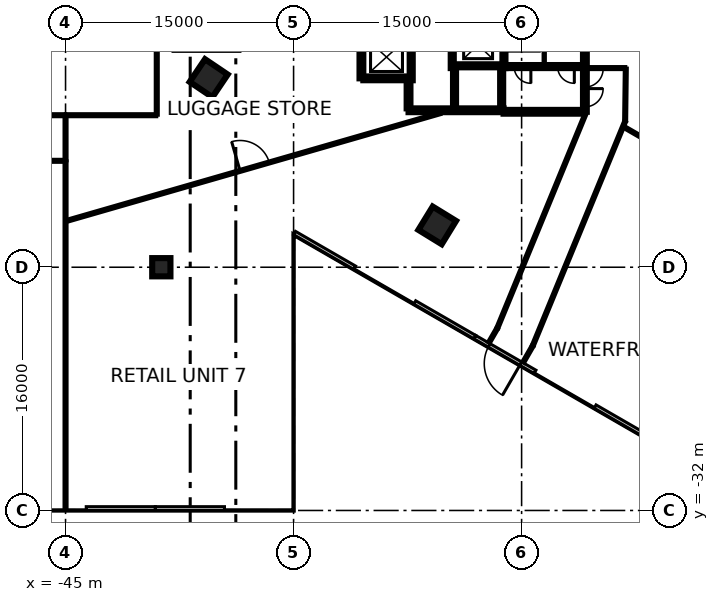
"""IFC4 building model, lengths in metres.
Left out: names, types, materials, properties, quantities, classifications, styles, units other than length and angle.
Written with IfcOpenShell. Run it as: python <this file> out.ifc"""

import sys

from ifc_helpers import new_model, si_unit, direction, frame, frame_2d, origin, origin_2d, place, context, subcontext, project, spatial, rectangle, extrude, element, fill, save


model = new_model("IFC4")
c1 = context("Model", 3, precision=1e-05, world=origin(), true_north=direction((0.0, 1.0)))
c2 = subcontext(c1, "Body", "Model", "MODEL_VIEW")
j1 = project(units=[si_unit("LENGTHUNIT", "METRE"), si_unit("PLANEANGLEUNIT", "RADIAN")], contexts=[c1])
p1 = place(None, origin())
s1 = spatial("IfcSite", under=j1, at=p1, CompositionType="ELEMENT")
p2 = place(p1, origin())
s2 = spatial("IfcBuilding", under=s1, at=p2, CompositionType="ELEMENT")
p3 = place(p2, origin())
s3 = spatial("IfcBuildingStorey", under=s2, at=p3, CompositionType="ELEMENT", Elevation=0.0)
for number, where, z_axis, x_axis in (
    (1, (-35.583, -3.565, -0.45), (0.0, 0.0, 1.0), (0.559, 0.829, 0.0)),
    (2, (-20.552, -13.248, -0.45), (0.0, 0.0, 1.0), (0.523, 0.852, 0.0)),
):
    element("IfcColumn", number, at=place(p3, frame(where, z_axis=z_axis, x_axis=x_axis)), inside=s3, PredefinedType="COLUMN", context=c2, shape_type="SweptSolid", body=[
        extrude(rectangle(XDim=1.8, YDim=1.8, at=origin_2d()), origin(), (0.0, 0.0, 1.0), 5.15),
    ])
p4 = place(p3, frame((-38.7, -16.0, -0.45), z_axis=(0.0, 0.0, 1.0), x_axis=(1.0, 0.0, 0.0)))
e3 = element("IfcColumn", 3, at=p4, inside=s3, PredefinedType="COLUMN", context=c2, shape_type="SweptSolid", body=[
    extrude(rectangle(XDim=1.2, YDim=1.2, at=origin_2d()), origin(), (0.0, 0.0, 1.0), 7.55),
])
p5 = place(p3, frame((-25.983, -16.031, 0.0), z_axis=(0.0, 0.0, 1.0), x_axis=(-0.866023543838, 0.500003221507, 0.0)))
e4 = element("IfcWall", 4, at=p5, inside=s3, PredefinedType="SOLIDWALL", context=c2, shape_type="SweptSolid", body=[
    extrude(rectangle(XDim=4.566, YDim=0.25, at=frame_2d((2.283, 0.0))), origin(), (0.0, 0.0, 1.0), 7.1),
])
p6 = place(p3, frame((-18.074, -20.598, 0.0), z_axis=(0.0, 0.0, 1.0), x_axis=(-0.866010176527, 0.500026373457, 0.0)))
e5 = element("IfcWall", 5, at=p6, inside=s3, PredefinedType="SOLIDWALL", context=c2, shape_type="SweptSolid", body=[
    extrude(rectangle(XDim=4.566, YDim=0.25, at=frame_2d((2.283, 0.0))), origin(), (0.0, 0.0, 1.0), 7.1),
])
p7 = place(p3, frame((-14.119, -22.881, 0.0), z_axis=(0.0, 0.0, 1.0), x_axis=(-0.866023543838, 0.500003221507, 0.0)))
e6 = element("IfcWall", 6, at=p7, inside=s3, PredefinedType="SOLIDWALL", context=c2, shape_type="SweptSolid", body=[
    extrude(rectangle(XDim=4.566, YDim=0.25, at=frame_2d((2.283, 0.0))), origin(), (0.0, 0.0, 1.0), 7.1),
])
p8 = place(p7, frame((1.083, 0.0, 0.0)))
e7 = element("IfcOpeningElement", 7, at=p8, cuts=e6, PredefinedType="OPENING", context=c2, shape_type="SweptSolid", body=[
    extrude(rectangle(XDim=2.4, YDim=2.4, at=frame_2d((1.2, 1.2))), frame((0.0, 0.135, 0.0), z_axis=(0.0, -1.0, 0.0), x_axis=(1.0, 0.0, 0.0)), (0.0, 0.0, 1.0), 0.27),
])
p9 = place(p3, frame((-6.21, -27.447, 0.0), z_axis=(0.0, 0.0, 1.0), x_axis=(-0.866046694585, 0.499963121439, 0.0)))
e8 = element("IfcWall", 8, at=p9, inside=s3, PredefinedType="SOLIDWALL", context=c2, shape_type="SweptSolid", body=[
    extrude(rectangle(XDim=4.566, YDim=0.25, at=frame_2d((2.283, 0.0))), origin(), (0.0, 0.0, 1.0), 7.1),
])
for number, where, z_axis, x_axis in (
    (9, (-39.092, -31.875, 0.0), (0.0, 0.0, 1.0), (-1.0, 0.0, 0.0)),
    (10, (-34.546, -31.875, 0.0), (0.0, 0.0, 1.0), (-1.0, 0.0, 0.0)),
):
    element("IfcWall", number, at=place(p3, frame(where, z_axis=z_axis, x_axis=x_axis)), inside=s3, PredefinedType="SOLIDWALL", context=c2, shape_type="SweptSolid", body=[
        extrude(rectangle(XDim=4.546, YDim=0.25, at=frame_2d((2.273, 0.0))), origin(), (0.0, 0.0, 1.0), 7.1),
    ])
p10 = place(p3, frame((-10.837, 5.775, 0.0), z_axis=(0.0, 0.0, 1.0), x_axis=(0.0, -1.0, 0.0)))
e11 = element("IfcWall", 11, at=p10, inside=s3, PredefinedType="SHEAR", context=c2, shape_type="SweptSolid", body=[
    extrude(rectangle(XDim=11.55, YDim=0.25, at=frame_2d((5.775, 0.0))), origin(), (0.0, 0.0, 1.0), 7.1),
])
p11 = place(p10, frame((10.025, 0.0, 0.0)))
e12 = element("IfcOpeningElement", 12, at=p11, cuts=e11, PredefinedType="OPENING", context=c2, shape_type="SweptSolid", body=[
    extrude(rectangle(XDim=1.2, YDim=2.1, at=frame_2d((0.6, 1.05))), frame((0.0, 0.135, 0.0), z_axis=(0.0, -1.0, 0.0), x_axis=(1.0, 0.0, 0.0)), (0.0, 0.0, 1.0), 0.27),
])
p12 = place(p10, frame((8.725, 0.0, 0.0)))
e13 = element("IfcOpeningElement", 13, at=p12, cuts=e11, PredefinedType="OPENING", context=c2, shape_type="SweptSolid", body=[
    extrude(rectangle(XDim=1.2, YDim=2.1, at=frame_2d((0.6, 1.05))), frame((0.0, 0.135, 0.0), z_axis=(0.0, -1.0, 0.0), x_axis=(1.0, 0.0, 0.0)), (0.0, 0.0, 1.0), 0.27),
])
p13 = place(p3, frame((-16.187, -5.675, 0.0), z_axis=(0.0, 0.0, 1.0), x_axis=(-1.0, 0.0, 0.0)))
e14 = element("IfcWall", 14, at=p13, inside=s3, PredefinedType="SHEAR", context=c2, shape_type="SweptSolid", body=[
    extrude(rectangle(XDim=6.25, YDim=0.25, at=frame_2d((3.125, 0.0))), origin(), (0.0, 0.0, 1.0), 7.1),
])
p14 = place(p3, frame((-25.537, -3.575, 0.0), z_axis=(0.0, 0.0, 1.0), x_axis=(0.0, 1.0, 0.0)))
e15 = element("IfcWall", 15, at=p14, inside=s3, PredefinedType="SHEAR", context=c2, shape_type="SweptSolid", body=[
    extrude(rectangle(XDim=5.85, YDim=0.25, at=frame_2d((2.925, 0.0))), origin(), (0.0, 0.0, 1.0), 7.1),
])
p15 = place(p3, frame((-10.963, -5.775, 0.0), z_axis=(0.0, 0.0, 1.0), x_axis=(-1.0, 0.0, 0.0)))
e16 = element("IfcWall", 16, at=p15, inside=s3, PredefinedType="SHEAR", context=c2, shape_type="SweptSolid", body=[
    extrude(rectangle(XDim=5.225, YDim=0.25, at=frame_2d((2.612, 0.0))), origin(), (0.0, 0.0, 1.0), 7.1),
])
p16 = place(p3, frame((-22.437, -3.575, 0.0), z_axis=(0.0, 0.0, 1.0), x_axis=(-1.0, 0.0, 0.0)))
e17 = element("IfcWall", 17, at=p16, inside=s3, PredefinedType="SHEAR", context=c2, shape_type="SweptSolid", body=[
    extrude(rectangle(XDim=2.975, YDim=0.25, at=frame_2d((1.487, 0.0))), origin(), (0.0, 0.0, 1.0), 7.1),
])
p17 = place(p3, frame((-22.437, -5.55, 0.0), z_axis=(0.0, 0.0, 1.0), x_axis=(0.0, 1.0, 0.0)))
e18 = element("IfcWall", 18, at=p17, inside=s3, PredefinedType="SHEAR", context=c2, shape_type="SweptSolid", body=[
    extrude(rectangle(XDim=1.849, YDim=0.25, at=frame_2d((0.925, 0.0))), origin(), (0.0, 0.0, 1.0), 7.1),
])
p18 = place(p3, frame((-16.162, 2.951, 0.0), z_axis=(0.0, 0.0, 1.0), x_axis=(0.0, -1.0, 0.0)))
e19 = element("IfcWall", 19, at=p18, inside=s3, PredefinedType="SHEAR", context=c2, shape_type="SweptSolid", body=[
    extrude(rectangle(XDim=5.851, YDim=0.2, at=frame_2d((2.925, 0.0))), origin(), (0.0, 0.0, 1.0), 7.1),
])
p19 = place(p3, frame((-19.562, -2.9, 0.0), z_axis=(0.0, 0.0, 1.0), x_axis=(0.0, 1.0, 0.0)))
e20 = element("IfcWall", 20, at=p19, inside=s3, PredefinedType="SHEAR", context=c2, shape_type="SweptSolid", body=[
    extrude(rectangle(XDim=6.1, YDim=0.2, at=frame_2d((3.05, 0.0))), origin(), (0.0, 0.0, 1.0), 7.1),
])
p20 = place(p19, frame((3.95, 0.0, 0.0)))
e21 = element("IfcOpeningElement", 21, at=p20, cuts=e20, PredefinedType="OPENING", context=c2, shape_type="SweptSolid", body=[
    extrude(rectangle(XDim=1.1, YDim=2.1, at=frame_2d((0.55, 1.05))), frame((0.0, 0.11, 0.0), z_axis=(0.0, -1.0, 0.0), x_axis=(1.0, 0.0, 0.0)), (0.0, 0.0, 1.0), 0.22),
])
p21 = place(p19, frame((0.968, 0.0, 0.0)))
e22 = element("IfcOpeningElement", 22, at=p21, cuts=e20, PredefinedType="OPENING", context=c2, shape_type="SweptSolid", body=[
    extrude(rectangle(XDim=1.1, YDim=2.1, at=frame_2d((0.55, 1.05))), frame((0.0, 0.11, 0.0), z_axis=(0.0, -1.0, 0.0), x_axis=(1.0, 0.0, 0.0)), (0.0, 0.0, 1.0), 0.22),
])
p22 = place(p3, frame((-22.262, 2.4, 0.0), z_axis=(0.0, 0.0, 1.0), x_axis=(0.0, -1.0, 0.0)))
e23 = element("IfcWall", 23, at=p22, inside=s3, PredefinedType="SHEAR", context=c2, shape_type="SweptSolid", body=[
    extrude(rectangle(XDim=6.1, YDim=0.2, at=frame_2d((3.05, 0.0))), origin(), (0.0, 0.0, 1.0), 7.1),
])
p23 = place(p22, frame((1.0, 0.0, 0.0)))
e24 = element("IfcOpeningElement", 24, at=p23, cuts=e23, PredefinedType="OPENING", context=c2, shape_type="SweptSolid", body=[
    extrude(rectangle(XDim=1.2, YDim=2.1, at=frame_2d((0.6, 1.05))), frame((0.0, 0.11, 0.0), z_axis=(0.0, -1.0, 0.0), x_axis=(1.0, 0.0, 0.0)), (0.0, 0.0, 1.0), 0.22),
])
p24 = place(p22, frame((4.05, 0.0, 0.0)))
e25 = element("IfcOpeningElement", 25, at=p24, cuts=e23, PredefinedType="OPENING", context=c2, shape_type="SweptSolid", body=[
    extrude(rectangle(XDim=1.2, YDim=2.1, at=frame_2d((0.6, 1.05))), frame((0.0, 0.11, 0.0), z_axis=(0.0, -1.0, 0.0), x_axis=(1.0, 0.0, 0.0)), (0.0, 0.0, 1.0), 0.22),
])
p25 = place(p3, frame((-10.963, -2.8, 0.0), z_axis=(0.0, 0.0, 1.0), x_axis=(-1.0, 0.0, 0.0)))
e26 = element("IfcWall", 26, at=p25, inside=s3, PredefinedType="SHEAR", context=c2, shape_type="SweptSolid", body=[
    extrude(rectangle(XDim=5.098, YDim=0.2, at=frame_2d((2.549, 0.0))), origin(), (0.0, 0.0, 1.0), 7.1),
])
p26 = place(p25, frame((0.569, 0.0, 0.0)))
e27 = element("IfcOpeningElement", 27, at=p26, cuts=e26, PredefinedType="OPENING", context=c2, shape_type="SweptSolid", body=[
    extrude(rectangle(XDim=1.1, YDim=2.1, at=frame_2d((0.55, 1.05))), frame((0.0, 0.11, 0.0), z_axis=(0.0, -1.0, 0.0), x_axis=(1.0, 0.0, 0.0)), (0.0, 0.0, 1.0), 0.22),
])
p27 = place(p25, frame((3.428, 0.0, 0.0)))
e28 = element("IfcOpeningElement", 28, at=p27, cuts=e26, PredefinedType="OPENING", context=c2, shape_type="SweptSolid", body=[
    extrude(rectangle(XDim=1.1, YDim=2.1, at=frame_2d((0.55, 1.05))), frame((0.0, 0.11, 0.0), z_axis=(0.0, -1.0, 0.0), x_axis=(1.0, 0.0, 0.0)), (0.0, 0.0, 1.0), 0.22),
])
p28 = place(p3, frame((-19.412, -2.75, 0.0), z_axis=(0.0, 0.0, 1.0), x_axis=(1.0, 0.0, 0.0)))
e29 = element("IfcWall", 29, at=p28, inside=s3, PredefinedType="SHEAR", context=c2, shape_type="SweptSolid", body=[
    extrude(rectangle(XDim=3.1, YDim=0.2, at=frame_2d((1.55, 0.0))), origin(), (0.0, 0.0, 1.0), 7.1),
])
p29 = place(p3, frame((-16.312, -2.898, 0.0), z_axis=(0.0, 0.0, 1.0), x_axis=(0.0, -1.0, 0.0)))
e30 = element("IfcWall", 30, at=p29, inside=s3, PredefinedType="SHEAR", context=c2, shape_type="SweptSolid", body=[
    extrude(rectangle(XDim=2.651, YDim=0.2, at=frame_2d((1.325, 0.0))), origin(), (0.0, 0.0, 1.0), 7.1),
])
p30 = place(p29, frame((0.652, 0.0, 0.0)))
e31 = element("IfcOpeningElement", 31, at=p30, cuts=e30, PredefinedType="OPENING", context=c2, shape_type="SweptSolid", body=[
    extrude(rectangle(XDim=1.3, YDim=2.1, at=frame_2d((0.65, 1.05))), frame((0.0, 0.11, 0.0), z_axis=(0.0, -1.0, 0.0), x_axis=(1.0, 0.0, 0.0)), (0.0, 0.0, 1.0), 0.22),
])
p31 = place(p3, frame((-19.412, -5.549, 0.0), z_axis=(0.0, 0.0, 1.0), x_axis=(0.0, 1.0, 0.0)))
e32 = element("IfcWall", 32, at=p31, inside=s3, PredefinedType="SHEAR", context=c2, shape_type="SweptSolid", body=[
    extrude(rectangle(XDim=2.651, YDim=0.2, at=frame_2d((1.325, 0.0))), origin(), (0.0, 0.0, 1.0), 7.1),
])
p32 = place(p3, frame((-13.512, -2.695, 0.0), z_axis=(0.0, 0.0, 1.0), x_axis=(0.0, 1.0, 0.0)))
e33 = element("IfcWall", 33, at=p32, inside=s3, PredefinedType="PARTITIONING", context=c2, shape_type="SweptSolid", body=[
    extrude(rectangle(XDim=1.18, YDim=0.15, at=frame_2d((0.59, 0.0))), origin(), (0.0, 0.0, 1.0), 7.1),
])
p33 = place(p3, frame((-89.095, -6.0, 0.0), z_axis=(0.0, 0.0, 1.0), x_axis=(1.0, 0.0, 0.0)))
e34 = element("IfcWall", 34, at=p33, inside=s3, PredefinedType="PARTITIONING", context=c2, shape_type="SweptSolid", body=[
    extrude(rectangle(XDim=44.107, YDim=0.2, at=frame_2d((22.053, 0.0))), origin(), (0.0, 0.0, 1.0), 7.1),
])
p34 = place(p33, frame((23.596, 0.0, 0.0)))
e35 = element("IfcOpeningElement", 35, at=p34, cuts=e34, PredefinedType="OPENING", context=c2, shape_type="SweptSolid", body=[
    extrude(rectangle(XDim=2.4, YDim=2.1, at=frame_2d((1.2, 1.05))), frame((0.0, 0.11, 0.0), z_axis=(0.0, -1.0, 0.0), x_axis=(1.0, 0.0, 0.0)), (0.0, 0.0, 1.0), 0.22),
])
p35 = place(p33, frame((1.601, 0.0, 0.0)))
e36 = element("IfcOpeningElement", 36, at=p35, cuts=e34, PredefinedType="OPENING", context=c2, shape_type="SweptSolid", body=[
    extrude(rectangle(XDim=2.4, YDim=2.1, at=frame_2d((1.2, 1.05))), frame((0.0, 0.11, 0.0), z_axis=(0.0, -1.0, 0.0), x_axis=(1.0, 0.0, 0.0)), (0.0, 0.0, 1.0), 0.22),
])
p36 = place(p3, frame((-83.598, -9.0, 0.0), z_axis=(0.0, 0.0, 1.0), x_axis=(1.0, 0.0, 0.0)))
e37 = element("IfcWall", 37, at=p36, inside=s3, PredefinedType="PARTITIONING", context=c2, shape_type="SweptSolid", body=[
    extrude(rectangle(XDim=38.598, YDim=0.2, at=frame_2d((19.299, 0.0))), origin(), (0.0, 0.0, 1.0), 7.1),
])
p37 = place(p36, frame((15.649, 0.0, 0.0)))
e38 = element("IfcOpeningElement", 38, at=p37, cuts=e37, PredefinedType="OPENING", context=c2, shape_type="SweptSolid", body=[
    extrude(rectangle(XDim=0.9, YDim=2.1, at=frame_2d((0.45, 1.05))), frame((0.0, 0.11, 0.0), z_axis=(0.0, -1.0, 0.0), x_axis=(1.0, 0.0, 0.0)), (0.0, 0.0, 1.0), 0.22),
])
p38 = place(p36, frame((30.093, 0.0, 0.0)))
e39 = element("IfcOpeningElement", 39, at=p38, cuts=e37, PredefinedType="OPENING", context=c2, shape_type="SweptSolid", body=[
    extrude(rectangle(XDim=2.0, YDim=2.1, at=frame_2d((1.0, 1.05))), frame((0.0, 0.11, 0.0), z_axis=(0.0, -1.0, 0.0), x_axis=(1.0, 0.0, 0.0)), (0.0, 0.0, 1.0), 0.22),
])
p39 = place(p3, frame((-45.0, -9.0, 0.0), z_axis=(0.0, 0.0, 1.0), x_axis=(0.0, 1.0, 0.0)))
e40 = element("IfcWall", 40, at=p39, inside=s3, PredefinedType="PARTITIONING", context=c2, shape_type="SweptSolid", body=[
    extrude(rectangle(XDim=2.998, YDim=0.2, at=frame_2d((1.499, 0.0))), origin(), (0.0, 0.0, 1.0), 7.1),
])
p40 = place(p3, frame((-17.16, -20.981, 0.0), z_axis=(0.0, 0.0, 1.0), x_axis=(0.500069753975, 0.865985127562, 0.0)))
e41 = element("IfcWall", 41, at=p40, inside=s3, PredefinedType="PARTITIONING", context=c2, shape_type="SweptSolid", body=[
    extrude(rectangle(XDim=1.115, YDim=0.2, at=frame_2d((0.558, 0.0))), origin(), (0.0, 0.0, 1.0), 7.1),
])
p41 = place(p3, frame((-16.602, -20.015, 0.0), z_axis=(0.0, 0.0, 1.0), x_axis=(0.380627809016, 0.924728322808, 0.0)))
e42 = element("IfcWall", 42, at=p41, inside=s3, PredefinedType="PARTITIONING", context=c2, shape_type="SweptSolid", body=[
    extrude(rectangle(XDim=15.199, YDim=0.2, at=frame_2d((7.6, 0.0))), origin(), (0.0, 0.0, 1.0), 4.7),
])
p42 = place(p3, frame((-14.908, -22.281, 0.0), z_axis=(0.0, 0.0, 1.0), x_axis=(0.499223722114, 0.866473124384, 0.0)))
e43 = element("IfcWall", 43, at=p42, inside=s3, PredefinedType="PARTITIONING", context=c2, shape_type="SweptSolid", body=[
    extrude(rectangle(XDim=1.286, YDim=0.2, at=frame_2d((0.643, 0.0))), origin(), (0.0, 0.0, 1.0), 7.1),
])
p43 = place(p3, frame((-14.266, -21.167, 0.0), z_axis=(0.0, 0.0, 1.0), x_axis=(0.380713644122, 0.924692987526, 0.0)))
e44 = element("IfcWall", 44, at=p43, inside=s3, PredefinedType="PARTITIONING", context=c2, shape_type="SweptSolid", body=[
    extrude(rectangle(XDim=15.96, YDim=0.2, at=frame_2d((7.98, 0.0))), origin(), (0.0, 0.0, 1.0), 4.7),
])
p44 = place(p3, frame((-10.652, -2.9, 0.0), z_axis=(0.0, 0.0, 1.0), x_axis=(1.0, 0.0, 0.0)))
e45 = element("IfcWall", 45, at=p44, inside=s3, PredefinedType="PARTITIONING", context=c2, shape_type="SweptSolid", body=[
    extrude(rectangle(XDim=2.506, YDim=0.2, at=frame_2d((1.253, 0.0))), origin(), (0.0, 0.0, 1.0), 7.1),
])
p45 = place(p3, frame((-8.19, -6.409, 0.0), z_axis=(0.0, 0.0, 1.0), x_axis=(0.012522499567, 0.999921590428, 0.0)))
e46 = element("IfcWall", 46, at=p45, inside=s3, PredefinedType="PARTITIONING", context=c2, shape_type="SweptSolid", body=[
    extrude(rectangle(XDim=3.509, YDim=0.2, at=frame_2d((1.755, 0.0))), origin(), (0.0, 0.0, 1.0), 7.1),
])
p46 = place(p3, frame((-45.01, -6.0, 0.0), z_axis=(0.0, 0.0, 1.0), x_axis=(1.0, 0.0, 0.0)))
e47 = element("IfcWall", 47, at=p46, inside=s3, PredefinedType="PARTITIONING", context=c2, shape_type="SweptSolid", body=[
    extrude(rectangle(XDim=6.01, YDim=0.2, at=frame_2d((3.005, 0.0))), origin(), (0.0, 0.0, 1.0), 7.1),
])
p47 = place(p3, frame((-45.0, -31.995, 0.0), z_axis=(0.0, 0.0, 1.0), x_axis=(0.0, 1.0, 0.0)))
e48 = element("IfcWall", 48, at=p47, inside=s3, PredefinedType="PARTITIONING", context=c2, shape_type="SweptSolid", body=[
    extrude(rectangle(XDim=22.993, YDim=0.2, at=frame_2d((11.497, 0.0))), origin(), (0.0, 0.0, 1.0), 7.1),
])
p48 = place(p3, frame((-44.998, -12.972, 0.0), z_axis=(0.0, 0.0, 1.0), x_axis=(0.960873245647, 0.27698845788, 0.0)))
e49 = element("IfcWall", 49, at=p48, inside=s3, PredefinedType="PARTITIONING", context=c2, shape_type="SweptSolid", body=[
    extrude(rectangle(XDim=25.676, YDim=0.2, at=frame_2d((12.838, 0.0))), origin(), (0.0, 0.0, 1.0), 4.7),
])
p49 = place(p48, frame((11.946, 0.0, 0.0)))
e50 = element("IfcOpeningElement", 50, at=p49, cuts=e49, PredefinedType="OPENING", context=c2, shape_type="SweptSolid", body=[
    extrude(rectangle(XDim=2.0, YDim=2.1, at=frame_2d((1.0, 1.05))), frame((0.0, 0.11, 0.0), z_axis=(0.0, -1.0, 0.0), x_axis=(1.0, 0.0, 0.0)), (0.0, 0.0, 1.0), 0.22),
])
p50 = place(p3, frame((-39.0, -6.0, 0.0), z_axis=(0.0, 0.0, 1.0), x_axis=(0.0, 1.0, 0.0)))
e51 = element("IfcWall", 51, at=p50, inside=s3, PredefinedType="PARTITIONING", context=c2, shape_type="SweptSolid", body=[
    extrude(rectangle(XDim=12.0, YDim=0.2, at=frame_2d((6.0, 0.0))), origin(), (0.0, 0.0, 1.0), 7.1),
])
p51 = place(p50, frame((9.044, 0.0, 0.0)))
e52 = element("IfcOpeningElement", 52, at=p51, cuts=e51, PredefinedType="OPENING", context=c2, shape_type="SweptSolid", body=[
    extrude(rectangle(XDim=2.4, YDim=2.1, at=frame_2d((1.2, 1.05))), frame((0.0, 0.11, 0.0), z_axis=(0.0, -1.0, 0.0), x_axis=(1.0, 0.0, 0.0)), (0.0, 0.0, 1.0), 0.22),
])
p52 = place(p3, frame((-8.321, -6.743, 0.0), z_axis=(0.0, 0.0, 1.0), x_axis=(0.8660028672, -0.500039032478, 0.0)))
e53 = element("IfcWall", 53, at=p52, inside=s3, PredefinedType="PARTITIONING", context=c2, shape_type="SweptSolid", body=[
    extrude(rectangle(XDim=7.588, YDim=0.2, at=frame_2d((3.794, 0.0))), origin(), (0.0, 0.0, 1.0), 7.1),
])
p53 = place(p52, frame((2.794, 0.0, 0.0)))
e54 = element("IfcOpeningElement", 54, at=p53, cuts=e53, PredefinedType="OPENING", context=c2, shape_type="SweptSolid", body=[
    extrude(rectangle(XDim=2.0, YDim=2.1, at=frame_2d((1.0, 1.05))), frame((0.0, 0.11, 0.0), z_axis=(0.0, -1.0, 0.0), x_axis=(1.0, 0.0, 0.0)), (0.0, 0.0, 1.0), 0.22),
])
p54 = place(p8, origin())
e55 = element("IfcDoor", 55, at=p54, inside=s3, OperationType="DOUBLE_DOOR_DOUBLE_SWING", PredefinedType="DOOR", context=c2, shape_type="SweptSolid", body=[
    extrude(rectangle(XDim=2.4, YDim=2.4, at=frame_2d((1.2, 1.2))), frame((0.0, 0.025, 0.0), z_axis=(0.0, -1.0, 0.0), x_axis=(1.0, 0.0, 0.0)), (0.0, 0.0, 1.0), 0.05),
])
fill(e7, e55)
p55 = place(p30, origin())
e56 = element("IfcDoor", 56, at=p55, inside=s3, OperationType="SLIDING_TO_LEFT", PredefinedType="DOOR", context=c2, shape_type="SweptSolid", body=[
    extrude(rectangle(XDim=1.3, YDim=2.1, at=frame_2d((0.65, 1.05))), frame((0.0, 0.025, 0.0), z_axis=(0.0, -1.0, 0.0), x_axis=(1.0, 0.0, 0.0)), (0.0, 0.0, 1.0), 0.05),
])
fill(e31, e56)
p56 = place(p21, origin())
e57 = element("IfcDoor", 57, at=p56, inside=s3, OperationType="DOUBLE_DOOR_SLIDING", PredefinedType="DOOR", context=c2, shape_type="SweptSolid", body=[
    extrude(rectangle(XDim=1.1, YDim=2.1, at=frame_2d((0.55, 1.05))), frame((0.0, 0.025, 0.0), z_axis=(0.0, -1.0, 0.0), x_axis=(1.0, 0.0, 0.0)), (0.0, 0.0, 1.0), 0.05),
])
fill(e22, e57)
p57 = place(p24, origin())
e58 = element("IfcDoor", 58, at=p57, inside=s3, OperationType="DOUBLE_DOOR_SLIDING", PredefinedType="DOOR", context=c2, shape_type="SweptSolid", body=[
    extrude(rectangle(XDim=1.2, YDim=2.1, at=frame_2d((0.6, 1.05))), frame((0.0, 0.025, 0.0), z_axis=(0.0, -1.0, 0.0), x_axis=(1.0, 0.0, 0.0)), (0.0, 0.0, 1.0), 0.05),
])
fill(e25, e58)
p58 = place(p11, origin())
e59 = element("IfcDoor", 59, at=p58, inside=s3, OperationType="SINGLE_SWING_LEFT", PredefinedType="DOOR", context=c2, shape_type="SweptSolid", body=[
    extrude(rectangle(XDim=1.2, YDim=2.1, at=frame_2d((0.6, 1.05))), frame((0.0, 0.025, 0.0), z_axis=(0.0, -1.0, 0.0), x_axis=(1.0, 0.0, 0.0)), (0.0, 0.0, 1.0), 0.05),
])
fill(e12, e59)
p59 = place(p12, origin())
e60 = element("IfcDoor", 60, at=p59, inside=s3, OperationType="SINGLE_SWING_RIGHT", PredefinedType="DOOR", context=c2, shape_type="SweptSolid", body=[
    extrude(rectangle(XDim=1.2, YDim=2.1, at=frame_2d((0.6, 1.05))), frame((0.0, 0.025, 0.0), z_axis=(0.0, -1.0, 0.0), x_axis=(1.0, 0.0, 0.0)), (0.0, 0.0, 1.0), 0.05),
])
fill(e13, e60)
p60 = place(p26, origin())
e61 = element("IfcDoor", 61, at=p60, inside=s3, OperationType="SINGLE_SWING_LEFT", PredefinedType="DOOR", context=c2, shape_type="SweptSolid", body=[
    extrude(rectangle(XDim=1.1, YDim=2.1, at=frame_2d((0.55, 1.05))), frame((0.0, 0.025, 0.0), z_axis=(0.0, -1.0, 0.0), x_axis=(1.0, 0.0, 0.0)), (0.0, 0.0, 1.0), 0.05),
])
fill(e27, e61)
p61 = place(p27, origin())
e62 = element("IfcDoor", 62, at=p61, inside=s3, OperationType="SINGLE_SWING_RIGHT", PredefinedType="DOOR", context=c2, shape_type="SweptSolid", body=[
    extrude(rectangle(XDim=1.1, YDim=2.1, at=frame_2d((0.55, 1.05))), frame((0.0, 0.025, 0.0), z_axis=(0.0, -1.0, 0.0), x_axis=(1.0, 0.0, 0.0)), (0.0, 0.0, 1.0), 0.05),
])
fill(e28, e62)
p62 = place(p49, frame((2.0, 0.0, 0.0), z_axis=(0.0, 0.0, 1.0), x_axis=(-1.0, 0.0, 0.0)))
e63 = element("IfcDoor", 63, at=p62, inside=s3, OperationType="DOUBLE_DOOR_SINGLE_SWING", PredefinedType="DOOR", context=c2, shape_type="SweptSolid", body=[
    extrude(rectangle(XDim=2.0, YDim=2.1, at=frame_2d((1.0, 1.05))), frame((0.0, 0.025, 0.0), z_axis=(0.0, -1.0, 0.0), x_axis=(1.0, 0.0, 0.0)), (0.0, 0.0, 1.0), 0.05),
])
fill(e50, e63)
save(model, sys.argv[1])
